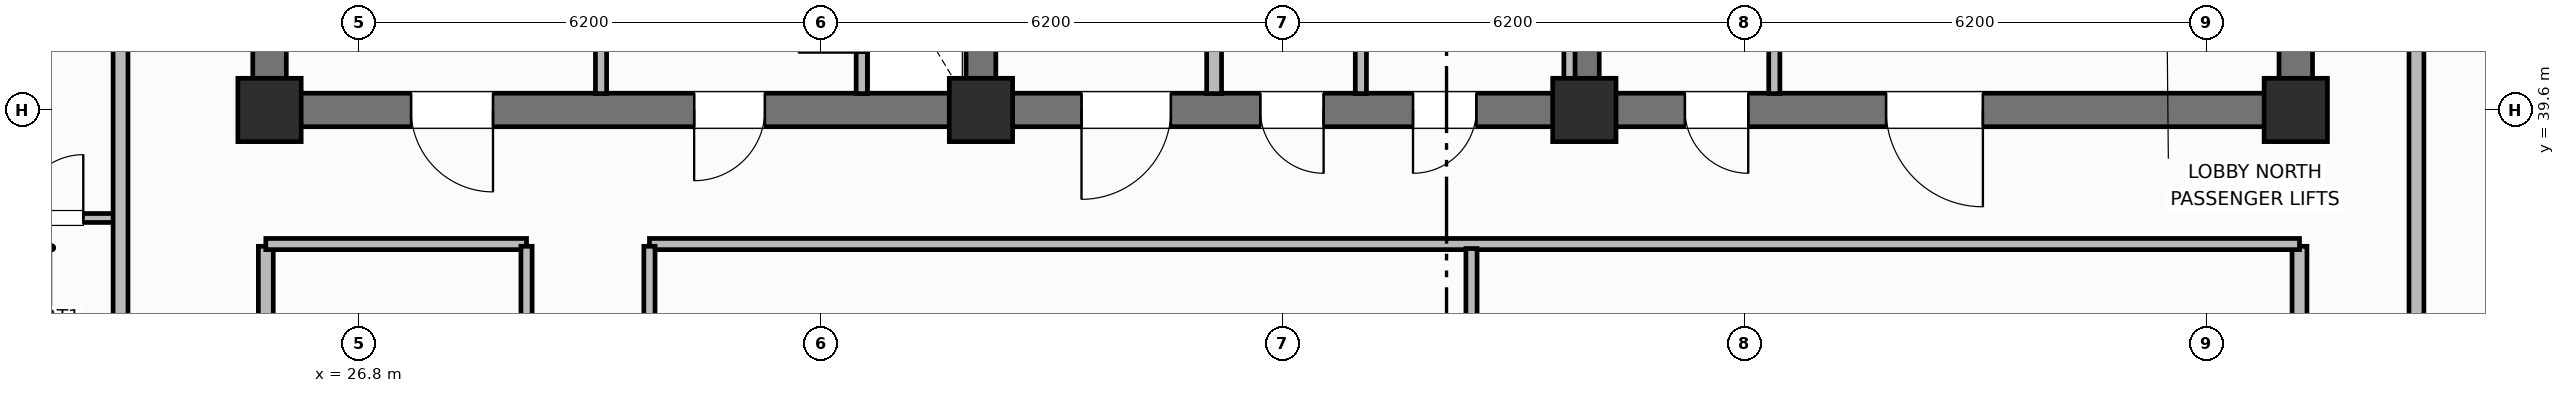
"""IFC4 building model, lengths in metres.
Left out: names, types, materials, properties, quantities, classifications, styles, units other than length and angle.
Written with IfcOpenShell. Run it as: python <this file> out.ifc"""

import sys

from ifc_helpers import new_model, si_unit, direction, frame, frame_2d, origin, origin_2d, place, context, subcontext, project, spatial, rectangle, extrude, element, fill, save


model = new_model("IFC4")
c1 = context("Model", 3, precision=1e-05, world=origin(), true_north=direction((0.0, 1.0)))
c2 = subcontext(c1, "Body", "Model", "MODEL_VIEW")
j1 = project(units=[si_unit("LENGTHUNIT", "METRE"), si_unit("PLANEANGLEUNIT", "RADIAN")], contexts=[c1])
p1 = place(None, origin())
s1 = spatial("IfcSite", under=j1, at=p1, CompositionType="ELEMENT")
p2 = place(p1, origin())
s2 = spatial("IfcBuilding", under=s1, at=p2, CompositionType="ELEMENT")
p3 = place(p2, frame((0.0, 0.0, 248.0)))
s3 = spatial("IfcBuildingStorey", under=s2, at=p3, CompositionType="ELEMENT", Elevation=248.0)
for number, where, z_axis, x_axis in (
    (1, (25.6, 39.825, 0.0), (0.0, 0.0, 1.0), (0.0, 1.0, 0.0)),
    (2, (52.8, 39.825, 0.0), (0.0, 0.0, 1.0), (0.0, 1.0, 0.0)),
):
    element("IfcWall", number, at=place(p3, frame(where, z_axis=z_axis, x_axis=x_axis)), inside=s3, PredefinedType="SHEAR", context=c2, shape_type="SweptSolid", body=[
        extrude(rectangle(XDim=5.75, YDim=0.45, at=frame_2d((2.875, 0.0))), origin(), (0.0, 0.0, 1.0), 3.7),
    ])
p4 = place(p3, frame((52.8, 39.6, 0.0), z_axis=(0.0, 0.0, 1.0), x_axis=(-1.0, 0.0, 0.0)))
e3 = element("IfcWall", 3, at=p4, inside=s3, PredefinedType="SHEAR", context=c2, shape_type="SweptSolid", body=[
    extrude(rectangle(XDim=27.2, YDim=0.45, at=frame_2d((13.6, 0.0))), origin(), (0.0, 0.0, 1.0), 3.7),
])
p5 = place(p4, frame((24.2, 0.0, 0.0)))
e4 = element("IfcOpeningElement", 4, at=p5, cuts=e3, PredefinedType="OPENING", context=c2, shape_type="SweptSolid", body=[
    extrude(rectangle(XDim=1.1, YDim=2.15, at=frame_2d((0.55, 1.075))), frame((0.0, 0.235, 0.0), z_axis=(0.0, -1.0, 0.0), x_axis=(1.0, 0.0, 0.0)), (0.0, 0.0, 1.0), 0.47),
])
p6 = place(p4, frame((20.55, 0.0, 0.0)))
e5 = element("IfcOpeningElement", 5, at=p6, cuts=e3, PredefinedType="OPENING", context=c2, shape_type="SweptSolid", body=[
    extrude(rectangle(XDim=0.95, YDim=2.1, at=frame_2d((0.475, 1.05))), frame((0.0, 0.235, 0.0), z_axis=(0.0, -1.0, 0.0), x_axis=(1.0, 0.0, 0.0)), (0.0, 0.0, 1.0), 0.47),
])
p7 = place(p4, frame((15.1, 0.0, 0.0)))
e6 = element("IfcOpeningElement", 6, at=p7, cuts=e3, PredefinedType="OPENING", context=c2, shape_type="SweptSolid", body=[
    extrude(rectangle(XDim=1.2, YDim=2.15, at=frame_2d((0.6, 1.075))), frame((0.0, 0.235, 0.0), z_axis=(0.0, -1.0, 0.0), x_axis=(1.0, 0.0, 0.0)), (0.0, 0.0, 1.0), 0.47),
])
p8 = place(p4, frame((13.05, 0.0, 0.0)))
e7 = element("IfcOpeningElement", 7, at=p8, cuts=e3, PredefinedType="OPENING", context=c2, shape_type="SweptSolid", body=[
    extrude(rectangle(XDim=0.85, YDim=2.1, at=frame_2d((0.425, 1.05))), frame((0.0, 0.235, 0.0), z_axis=(0.0, -1.0, 0.0), x_axis=(1.0, 0.0, 0.0)), (0.0, 0.0, 1.0), 0.47),
])
p9 = place(p4, frame((11.0, 0.0, 0.0)))
e8 = element("IfcOpeningElement", 8, at=p9, cuts=e3, PredefinedType="OPENING", context=c2, shape_type="SweptSolid", body=[
    extrude(rectangle(XDim=0.85, YDim=2.1, at=frame_2d((0.425, 1.05))), frame((0.0, 0.235, 0.0), z_axis=(0.0, -1.0, 0.0), x_axis=(1.0, 0.0, 0.0)), (0.0, 0.0, 1.0), 0.47),
])
p10 = place(p4, frame((7.35, 0.0, 0.0)))
e9 = element("IfcOpeningElement", 9, at=p10, cuts=e3, PredefinedType="OPENING", context=c2, shape_type="SweptSolid", body=[
    extrude(rectangle(XDim=0.85, YDim=2.1, at=frame_2d((0.425, 1.05))), frame((0.0, 0.235, 0.0), z_axis=(0.0, -1.0, 0.0), x_axis=(1.0, 0.0, 0.0)), (0.0, 0.0, 1.0), 0.47),
])
p11 = place(p4, frame((4.2, 0.0, 0.0)))
e10 = element("IfcOpeningElement", 10, at=p11, cuts=e3, PredefinedType="OPENING", context=c2, shape_type="SweptSolid", body=[
    extrude(rectangle(XDim=1.3, YDim=2.2, at=frame_2d((0.65, 1.1))), frame((0.0, 0.235, 0.0), z_axis=(0.0, -1.0, 0.0), x_axis=(1.0, 0.0, 0.0)), (0.0, 0.0, 1.0), 0.47),
])
for number, where, z_axis, x_axis in (
    (11, (35.15, 39.825, 0.0), (0.0, 0.0, 1.0), (0.0, 1.0, 0.0)),
    (12, (43.25, 39.825, 0.0), (0.0, 0.0, 1.0), (0.0, 1.0, 0.0)),
):
    element("IfcWall", number, at=place(p3, frame(where, z_axis=z_axis, x_axis=x_axis)), inside=s3, PredefinedType="SHEAR", context=c2, shape_type="SweptSolid", body=[
        extrude(rectangle(XDim=5.75, YDim=0.4, at=frame_2d((2.875, 0.0))), origin(), (0.0, 0.0, 1.0), 3.7),
    ])
for number, where, z_axis, x_axis in (
    (13, (25.6, 39.6, 0.0), (0.0, 0.0, 1.0), (1.0, 0.0, 0.0)),
    (14, (35.15, 39.6, 0.0), (0.0, 0.0, 1.0), (1.0, 0.0, 0.0)),
    (15, (43.25, 39.6, 0.0), (0.0, 0.0, 1.0), (1.0, 0.0, 0.0)),
    (16, (52.8, 39.6, 0.0), (0.0, 0.0, 1.0), (1.0, 0.0, 0.0)),
):
    element("IfcColumn", number, at=place(p3, frame(where, z_axis=z_axis, x_axis=x_axis)), inside=s3, PredefinedType="COLUMN", context=c2, shape_type="SweptSolid", body=[
        extrude(rectangle(XDim=0.85, YDim=0.85, at=origin_2d()), origin(), (0.0, 0.0, 1.0), 3.7),
    ])
p12 = place(p3, frame((33.55, 39.82, 0.0), z_axis=(0.0, 0.0, 1.0), x_axis=(0.0, 1.0, 0.0)))
e17 = element("IfcWall", 17, at=p12, inside=s3, PredefinedType="PARTITIONING", context=c2, shape_type="SweptSolid", body=[
    extrude(rectangle(XDim=2.13, YDim=0.15, at=frame_2d((1.065, 0.0))), origin(), (0.0, 0.0, 1.0), 2.56),
])
p13 = place(p12, frame((0.55, 0.0, 0.0)))
e18 = element("IfcOpeningElement", 18, at=p13, cuts=e17, PredefinedType="OPENING", context=c2, shape_type="SweptSolid", body=[
    extrude(rectangle(XDim=0.85, YDim=2.05, at=frame_2d((0.425, 1.025))), frame((0.0, 0.085, 0.0), z_axis=(0.0, -1.0, 0.0), x_axis=(1.0, 0.0, 0.0)), (0.0, 0.0, 1.0), 0.17),
])
p14 = place(p3, frame((30.05, 39.82, 0.0), z_axis=(0.0, 0.0, 1.0), x_axis=(0.0, 1.0, 0.0)))
e19 = element("IfcWall", 19, at=p14, inside=s3, PredefinedType="PARTITIONING", context=c2, shape_type="SweptSolid", body=[
    extrude(rectangle(XDim=2.13, YDim=0.15, at=frame_2d((1.065, 0.0))), origin(), (0.0, 0.0, 1.0), 2.56),
])
p15 = place(p3, frame((38.28, 39.82, 0.0), z_axis=(0.0, 0.0, 1.0), x_axis=(0.0, 1.0, 0.0)))
e20 = element("IfcWall", 20, at=p15, inside=s3, PredefinedType="PARTITIONING", context=c2, shape_type="SweptSolid", body=[
    extrude(rectangle(XDim=5.63, YDim=0.2, at=frame_2d((2.815, 0.0))), origin(), (0.0, 0.0, 1.0), 2.56),
])
for number, where, z_axis, x_axis in (
    (21, (43.05, 39.82, 0.0), (0.0, 0.0, 1.0), (0.0, 1.0, 0.0)),
    (22, (40.25, 39.82, 0.0), (0.0, 0.0, 1.0), (0.0, 1.0, 0.0)),
    (23, (45.8, 39.82, 0.0), (0.0, 0.0, 1.0), (0.0, 1.0, 0.0)),
):
    element("IfcWall", number, at=place(p3, frame(where, z_axis=z_axis, x_axis=x_axis)), inside=s3, PredefinedType="PARTITIONING", context=c2, shape_type="SweptSolid", body=[
        extrude(rectangle(XDim=5.63, YDim=0.15, at=frame_2d((2.815, 0.0))), origin(), (0.0, 0.0, 1.0), 2.56),
    ])
for number, where, z_axis, x_axis in (
    (24, (25.55, 18.63, 0.0), (0.0, 0.0, 1.0), (0.0, 1.0, 0.0)),
    (25, (52.85, 18.63, 0.0), (0.0, 0.0, 1.0), (0.0, 1.0, 0.0)),
):
    element("IfcWall", number, at=place(p3, frame(where, z_axis=z_axis, x_axis=x_axis)), inside=s3, PredefinedType="PARTITIONING", context=c2, shape_type="SweptSolid", body=[
        extrude(rectangle(XDim=19.14, YDim=0.2, at=frame_2d((9.57, 0.0))), origin(), (0.0, 0.0, 1.0), 2.56),
    ])
p16 = place(p3, frame((25.55, 37.8, 0.0), z_axis=(0.0, 0.0, 1.0), x_axis=(1.0, 0.0, 0.0)))
e26 = element("IfcWall", 26, at=p16, inside=s3, PredefinedType="PARTITIONING", context=c2, shape_type="SweptSolid", body=[
    extrude(rectangle(XDim=3.5, YDim=0.15, at=frame_2d((1.75, 0.0))), origin(), (0.0, 0.0, 1.0), 2.56),
])
p17 = place(p3, frame((30.7, 37.8, 0.0), z_axis=(0.0, 0.0, 1.0), x_axis=(1.0, 0.0, 0.0)))
e27 = element("IfcWall", 27, at=p17, inside=s3, PredefinedType="PARTITIONING", context=c2, shape_type="SweptSolid", body=[
    extrude(rectangle(XDim=22.15, YDim=0.15, at=frame_2d((11.075, 0.0))), origin(), (0.0, 0.0, 1.0), 2.56),
])
p18 = place(p3, frame((41.735, 18.66, 0.0), z_axis=(0.0, 0.0, 1.0), x_axis=(0.0, 1.0, 0.0)))
e28 = element("IfcWall", 28, at=p18, inside=s3, PredefinedType="PARTITIONING", context=c2, shape_type="SweptSolid", body=[
    extrude(rectangle(XDim=19.08, YDim=0.15, at=frame_2d((9.54, 0.0))), origin(), (0.0, 0.0, 1.0), 2.56),
])
p19 = place(p18, frame((6.5, 0.0, 0.0)))
e29 = element("IfcOpeningElement", 29, at=p19, cuts=e28, PredefinedType="OPENING", context=c2, shape_type="SweptSolid", body=[
    extrude(rectangle(XDim=1.0, YDim=2.15, at=frame_2d((0.5, 1.075))), frame((0.0, 0.085, 0.0), z_axis=(0.0, -1.0, 0.0), x_axis=(1.0, 0.0, 0.0)), (0.0, 0.0, 1.0), 0.17),
])
p20 = place(p3, frame((29.05, 18.63, 0.0), z_axis=(0.0, 0.0, 1.0), x_axis=(0.0, 1.0, 0.0)))
e30 = element("IfcWall", 30, at=p20, inside=s3, PredefinedType="PARTITIONING", context=c2, shape_type="SweptSolid", body=[
    extrude(rectangle(XDim=19.14, YDim=0.15, at=frame_2d((9.57, 0.0))), origin(), (0.0, 0.0, 1.0), 2.56),
])
p21 = place(p20, frame((5.5, 0.0, 0.0)))
e31 = element("IfcOpeningElement", 31, at=p21, cuts=e30, PredefinedType="OPENING", context=c2, shape_type="SweptSolid", body=[
    extrude(rectangle(XDim=1.0, YDim=2.15, at=frame_2d((0.5, 1.075))), frame((0.0, 0.085, 0.0), z_axis=(0.0, -1.0, 0.0), x_axis=(1.0, 0.0, 0.0)), (0.0, 0.0, 1.0), 0.17),
])
p22 = place(p3, frame((30.7, 18.63, 0.0), z_axis=(0.0, 0.0, 1.0), x_axis=(0.0, 1.0, 0.0)))
e32 = element("IfcWall", 32, at=p22, inside=s3, PredefinedType="PARTITIONING", context=c2, shape_type="SweptSolid", body=[
    extrude(rectangle(XDim=19.14, YDim=0.15, at=frame_2d((9.57, 0.0))), origin(), (0.0, 0.0, 1.0), 2.56),
])
p23 = place(p22, frame((5.5, 0.0, 0.0)))
e33 = element("IfcOpeningElement", 33, at=p23, cuts=e32, PredefinedType="OPENING", context=c2, shape_type="SweptSolid", body=[
    extrude(rectangle(XDim=1.0, YDim=2.15, at=frame_2d((0.5, 1.075))), frame((0.0, 0.085, 0.0), z_axis=(0.0, -1.0, 0.0), x_axis=(1.0, 0.0, 0.0)), (0.0, 0.0, 1.0), 0.17),
])
p24 = place(p3, frame((21.65, 38.15, 0.0), z_axis=(0.0, 0.0, 1.0), x_axis=(1.0, 0.0, 0.0)))
e34 = element("IfcWall", 34, at=p24, inside=s3, PredefinedType="PARTITIONING", context=c2, shape_type="SweptSolid", body=[
    extrude(rectangle(XDim=1.95, YDim=0.12, at=frame_2d((0.975, 0.0))), origin(), (0.0, 0.0, 1.0), 2.56),
])
p25 = place(p24, frame((0.6, 0.0, 0.0)))
e35 = element("IfcOpeningElement", 35, at=p25, cuts=e34, PredefinedType="OPENING", context=c2, shape_type="SweptSolid", body=[
    extrude(rectangle(XDim=0.85, YDim=2.1, at=frame_2d((0.425, 1.05))), frame((0.0, 0.07, 0.0), z_axis=(0.0, -1.0, 0.0), x_axis=(1.0, 0.0, 0.0)), (0.0, 0.0, 1.0), 0.14),
])
p26 = place(p3, frame((23.6, 9.95, 0.0), z_axis=(0.0, 0.0, 1.0), x_axis=(0.0, 1.0, 0.0)))
e36 = element("IfcWall", 36, at=p26, inside=s3, PredefinedType="PARTITIONING", context=c2, shape_type="SweptSolid", body=[
    extrude(rectangle(XDim=36.5, YDim=0.2, at=frame_2d((18.25, 0.0))), origin(), (0.0, 0.0, 1.0), 2.56),
])
p27 = place(p26, frame((3.25, 0.0, 0.0)))
e37 = element("IfcOpeningElement", 37, at=p27, cuts=e36, PredefinedType="OPENING", context=c2, shape_type="SweptSolid", body=[
    extrude(rectangle(XDim=1.0, YDim=2.15, at=frame_2d((0.5, 1.075))), frame((0.0, 0.11, 0.0), z_axis=(0.0, -1.0, 0.0), x_axis=(1.0, 0.0, 0.0)), (0.0, 0.0, 1.0), 0.22),
])
p28 = place(p26, frame((23.5, 0.0, 0.0)))
e38 = element("IfcOpeningElement", 38, at=p28, cuts=e36, PredefinedType="OPENING", context=c2, shape_type="SweptSolid", body=[
    extrude(rectangle(XDim=1.0, YDim=2.15, at=frame_2d((0.5, 1.075))), frame((0.0, 0.11, 0.0), z_axis=(0.0, -1.0, 0.0), x_axis=(1.0, 0.0, 0.0)), (0.0, 0.0, 1.0), 0.22),
])
p29 = place(p3, frame((54.42, 9.95, 0.0), z_axis=(0.0, 0.0, 1.0), x_axis=(0.0, 1.0, 0.0)))
e39 = element("IfcWall", 39, at=p29, inside=s3, PredefinedType="PARTITIONING", context=c2, shape_type="SweptSolid", body=[
    extrude(rectangle(XDim=36.5, YDim=0.2, at=frame_2d((18.25, 0.0))), origin(), (0.0, 0.0, 1.0), 2.56),
])
p30 = place(p29, frame((3.25, 0.0, 0.0)))
e40 = element("IfcOpeningElement", 40, at=p30, cuts=e39, PredefinedType="OPENING", context=c2, shape_type="SweptSolid", body=[
    extrude(rectangle(XDim=1.0, YDim=2.15, at=frame_2d((0.5, 1.075))), frame((0.0, 0.11, 0.0), z_axis=(0.0, -1.0, 0.0), x_axis=(1.0, 0.0, 0.0)), (0.0, 0.0, 1.0), 0.22),
])
p31 = place(p13, origin())
e41 = element("IfcDoor", 41, at=p31, inside=s3, OperationType="SINGLE_SWING_LEFT", PredefinedType="TRAPDOOR", context=c2, shape_type="SweptSolid", body=[
    extrude(rectangle(XDim=0.85, YDim=2.05, at=frame_2d((0.425, 1.025))), frame((0.0, 0.025, 0.0), z_axis=(0.0, -1.0, 0.0), x_axis=(1.0, 0.0, 0.0)), (0.0, 0.0, 1.0), 0.05),
])
fill(e18, e41)
p32 = place(p25, origin())
e42 = element("IfcDoor", 42, at=p32, inside=s3, OperationType="SINGLE_SWING_RIGHT", PredefinedType="DOOR", context=c2, shape_type="SweptSolid", body=[
    extrude(rectangle(XDim=0.85, YDim=2.1, at=frame_2d((0.425, 1.05))), frame((0.0, 0.025, 0.0), z_axis=(0.0, -1.0, 0.0), x_axis=(1.0, 0.0, 0.0)), (0.0, 0.0, 1.0), 0.05),
])
fill(e35, e42)
p33 = place(p5, origin())
e43 = element("IfcDoor", 43, at=p33, inside=s3, OperationType="SINGLE_SWING_LEFT", PredefinedType="DOOR", context=c2, shape_type="SweptSolid", body=[
    extrude(rectangle(XDim=1.1, YDim=2.15, at=frame_2d((0.55, 1.075))), frame((0.0, 0.025, 0.0), z_axis=(0.0, -1.0, 0.0), x_axis=(1.0, 0.0, 0.0)), (0.0, 0.0, 1.0), 0.05),
])
fill(e4, e43)
p34 = place(p6, origin())
e44 = element("IfcDoor", 44, at=p34, inside=s3, OperationType="SINGLE_SWING_RIGHT", PredefinedType="DOOR", context=c2, shape_type="SweptSolid", body=[
    extrude(rectangle(XDim=0.95, YDim=2.1, at=frame_2d((0.475, 1.05))), frame((0.0, 0.025, 0.0), z_axis=(0.0, -1.0, 0.0), x_axis=(1.0, 0.0, 0.0)), (0.0, 0.0, 1.0), 0.05),
])
fill(e5, e44)
p35 = place(p7, origin())
e45 = element("IfcDoor", 45, at=p35, inside=s3, OperationType="SINGLE_SWING_RIGHT", PredefinedType="DOOR", context=c2, shape_type="SweptSolid", body=[
    extrude(rectangle(XDim=1.2, YDim=2.15, at=frame_2d((0.6, 1.075))), frame((0.0, 0.025, 0.0), z_axis=(0.0, -1.0, 0.0), x_axis=(1.0, 0.0, 0.0)), (0.0, 0.0, 1.0), 0.05),
])
fill(e6, e45)
p36 = place(p8, origin())
e46 = element("IfcDoor", 46, at=p36, inside=s3, OperationType="SINGLE_SWING_LEFT", PredefinedType="DOOR", context=c2, shape_type="SweptSolid", body=[
    extrude(rectangle(XDim=0.85, YDim=2.1, at=frame_2d((0.425, 1.05))), frame((0.0, 0.025, 0.0), z_axis=(0.0, -1.0, 0.0), x_axis=(1.0, 0.0, 0.0)), (0.0, 0.0, 1.0), 0.05),
])
fill(e7, e46)
p37 = place(p9, origin())
e47 = element("IfcDoor", 47, at=p37, inside=s3, OperationType="SINGLE_SWING_RIGHT", PredefinedType="DOOR", context=c2, shape_type="SweptSolid", body=[
    extrude(rectangle(XDim=0.85, YDim=2.1, at=frame_2d((0.425, 1.05))), frame((0.0, 0.025, 0.0), z_axis=(0.0, -1.0, 0.0), x_axis=(1.0, 0.0, 0.0)), (0.0, 0.0, 1.0), 0.05),
])
fill(e8, e47)
p38 = place(p10, origin())
e48 = element("IfcDoor", 48, at=p38, inside=s3, OperationType="SINGLE_SWING_LEFT", PredefinedType="DOOR", context=c2, shape_type="SweptSolid", body=[
    extrude(rectangle(XDim=0.85, YDim=2.1, at=frame_2d((0.425, 1.05))), frame((0.0, 0.025, 0.0), z_axis=(0.0, -1.0, 0.0), x_axis=(1.0, 0.0, 0.0)), (0.0, 0.0, 1.0), 0.05),
])
fill(e9, e48)
p39 = place(p11, origin())
e49 = element("IfcDoor", 49, at=p39, inside=s3, OperationType="SINGLE_SWING_LEFT", PredefinedType="DOOR", context=c2, shape_type="SweptSolid", body=[
    extrude(rectangle(XDim=1.3, YDim=2.2, at=frame_2d((0.65, 1.1))), frame((0.0, 0.025, 0.0), z_axis=(0.0, -1.0, 0.0), x_axis=(1.0, 0.0, 0.0)), (0.0, 0.0, 1.0), 0.05),
])
fill(e10, e49)
save(model, sys.argv[1])
